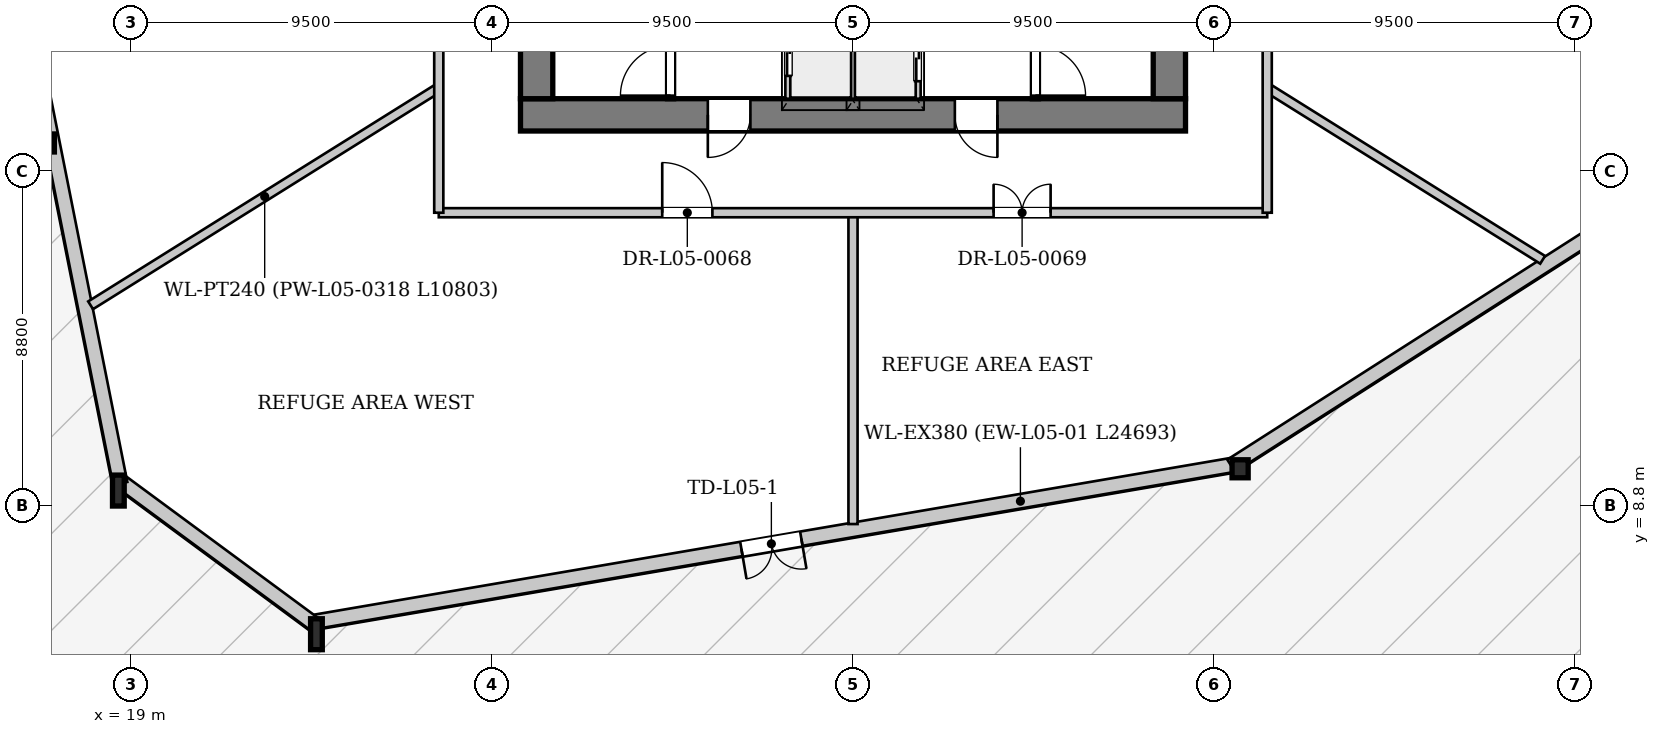
"""IFC4 building model, lengths in metres.
Left out: names, types, materials, properties, quantities, classifications, styles, units other than length and angle.
Written with IfcOpenShell. Run it as: python <this file> out.ifc"""

import sys

from ifc_helpers import new_model, si_unit, direction, frame, frame_2d, origin, origin_2d, place, context, subcontext, project, spatial, rectangle, i_section, extrude, source, transform, mapped, element, fill, save


model = new_model("IFC4")
c1 = context("Model", 3, precision=1e-05, world=origin(), true_north=direction((0.0, 1.0)))
c2 = subcontext(c1, "Body", "Model", "MODEL_VIEW")
j1 = project(units=[si_unit("LENGTHUNIT", "METRE"), si_unit("PLANEANGLEUNIT", "RADIAN")], contexts=[c1])
p1 = place(None, origin())
s1 = spatial("IfcSite", under=j1, at=p1, CompositionType="ELEMENT")
p2 = place(p1, origin())
s2 = spatial("IfcBuilding", under=s1, at=p2, CompositionType="ELEMENT")
p3 = place(p2, frame((0.0, 0.0, 24.6)))
s3 = spatial("IfcBuildingStorey", under=s2, at=p3, CompositionType="ELEMENT", Elevation=24.6)
m1 = source(origin(), c2, "Body", "SweptSolid", [
    extrude(i_section(OverallWidth=0.424, OverallDepth=0.474, WebThickness=0.043, FlangeThickness=0.068, at=origin_2d()), origin(), (0.0, 0.0, 1.0), 4.549),
])
p4 = place(p3, frame((16.708, 18.502, 0.0), z_axis=(0.028551868184, -0.073311751767, 0.996900284821), x_axis=(0.931825331576, 0.362907083747, 0.0)))
e1 = element("IfcColumn", 1, at=p4, inside=s3, PredefinedType="COLUMN", context=c2, shape_type="MappedRepresentation", body=[
    mapped(m1, transform((0.0, 0.0, 0.0), x_axis=(1.0, 0.0, 0.0), y_axis=(0.0, 1.0, 0.0), z_axis=(0.0, 0.0, 1.0), scale=1.0)),
])
m2 = source(origin(), c2, "Body", "SweptSolid", [
    extrude(i_section(OverallWidth=0.308, OverallDepth=0.814, WebThickness=0.021, FlangeThickness=0.04, at=origin_2d()), origin(), (0.0, 0.0, 1.0), 4.553),
])
p5 = place(p3, frame((18.532, 9.341, 0.0), z_axis=(0.060052750776, -0.066701448183, 0.995964147916), x_axis=(0.74317531308, 0.669096744895, 0.0)))
e2 = element("IfcColumn", 2, at=p5, inside=s3, PredefinedType="COLUMN", context=c2, shape_type="MappedRepresentation", body=[
    mapped(m2, transform((0.0, 0.0, 0.0), x_axis=(1.0, 0.0, 0.0), y_axis=(0.0, 1.0, 0.0), z_axis=(0.0, 0.0, 1.0), scale=1.0)),
])
m3 = source(origin(), c2, "Body", "SweptSolid", [
    extrude(i_section(OverallWidth=0.308, OverallDepth=0.814, WebThickness=0.021, FlangeThickness=0.04, at=origin_2d()), origin(), (0.0, 0.0, 1.0), 4.552),
])
p6 = place(p3, frame((23.714, 5.52, 0.0), z_axis=(0.073094440439, -0.048747502831, 0.996132964892), x_axis=(0.554841046628, 0.831956376847, 0.0)))
e3 = element("IfcColumn", 3, at=p6, inside=s3, PredefinedType="COLUMN", context=c2, shape_type="MappedRepresentation", body=[
    mapped(m3, transform((0.0, 0.0, 0.0), x_axis=(1.0, 0.0, 0.0), y_axis=(0.0, 1.0, 0.0), z_axis=(0.0, 0.0, 1.0), scale=1.0)),
])
m4 = source(origin(), c2, "Body", "SweptSolid", [
    extrude(i_section(OverallWidth=0.424, OverallDepth=0.474, WebThickness=0.043, FlangeThickness=0.068, at=origin_2d()), origin(), (0.0, 0.0, 1.0), 4.545),
])
p7 = place(p3, frame((48.054, 9.683, 0.0), z_axis=(0.058169293958, 0.035180874924, 0.997686643832), x_axis=(-0.517513521593, 0.855675028833, 0.0)))
e4 = element("IfcColumn", 4, at=p7, inside=s3, PredefinedType="COLUMN", context=c2, shape_type="MappedRepresentation", body=[
    mapped(m4, transform((0.0, 0.0, 0.0), x_axis=(1.0, 0.0, 0.0), y_axis=(0.0, 1.0, 0.0), z_axis=(0.0, 0.0, 1.0), scale=1.0)),
])
p8 = place(p3, frame((48.022, 9.87, 0.0), z_axis=(0.0, 0.0, 1.0), x_axis=(-0.985690903752, -0.168562873316, 0.0)))
e5 = element("IfcWall", 5, at=p8, inside=s3, PredefinedType="SOLIDWALL", context=c2, shape_type="SweptSolid", body=[
    extrude(rectangle(XDim=24.693, YDim=0.38, at=frame_2d((12.347, 0.0))), origin(), (0.0, 0.0, 1.0), 3.742),
])
p9 = place(p8, frame((11.547, 0.0, 0.0)))
e6 = element("IfcOpeningElement", 6, at=p9, cuts=e5, PredefinedType="OPENING", context=c2, shape_type="SweptSolid", body=[
    extrude(rectangle(XDim=1.6, YDim=2.3, at=frame_2d((0.8, 1.15))), frame((0.0, 0.2, 0.0), z_axis=(0.0, -1.0, 0.0), x_axis=(1.0, 0.0, 0.0)), (0.0, 0.0, 1.0), 0.4),
])
p10 = place(p3, frame((23.827, 5.673, 0.0), z_axis=(0.0, 0.0, 1.0), x_axis=(-0.804887121536, 0.593427941359, 0.0)))
e7 = element("IfcWall", 7, at=p10, inside=s3, PredefinedType="SOLIDWALL", context=c2, shape_type="SweptSolid", body=[
    extrude(rectangle(XDim=6.439, YDim=0.38, at=frame_2d((3.219, 0.0))), origin(), (0.0, 0.0, 1.0), 3.742),
])
p11 = place(p3, frame((18.718, 9.378, 0.0), z_axis=(0.0, 0.0, 1.0), x_axis=(-0.195238920641, 0.980755710596, 0.0)))
e8 = element("IfcWall", 8, at=p11, inside=s3, PredefinedType="SOLIDWALL", context=c2, shape_type="SweptSolid", body=[
    extrude(rectangle(XDim=18.681, YDim=0.38, at=frame_2d((9.34, 0.0))), origin(), (0.0, 0.0, 1.0), 3.742),
])
p12 = place(p3, frame((68.756, 23.145, 0.0), z_axis=(0.0, 0.0, 1.0), x_axis=(-0.842494342466, -0.538705191095, 0.0)))
e9 = element("IfcWall", 9, at=p12, inside=s3, PredefinedType="SOLIDWALL", context=c2, shape_type="SweptSolid", body=[
    extrude(rectangle(XDim=24.693, YDim=0.38, at=frame_2d((12.347, 0.0))), origin(), (0.0, 0.0, 1.0), 3.742),
])
p13 = place(p3, frame((46.75, 19.075, 0.0), z_axis=(0.0, 0.0, 1.0), x_axis=(-1.0, 0.0, 0.0)))
e10 = element("IfcWall", 10, at=p13, inside=s3, PredefinedType="SHEAR", context=c2, shape_type="SweptSolid", body=[
    extrude(rectangle(XDim=17.5, YDim=0.85, at=frame_2d((8.75, 0.0))), origin(), (0.0, 0.0, 1.0), 4.45),
])
p14 = place(p13, frame((4.95, 0.0, 0.0)))
e11 = element("IfcOpeningElement", 11, at=p14, cuts=e10, PredefinedType="OPENING", context=c2, shape_type="SweptSolid", body=[
    extrude(rectangle(XDim=1.12, YDim=2.25, at=frame_2d((0.56, 1.125))), frame((0.0, 0.435, 0.0), z_axis=(0.0, -1.0, 0.0), x_axis=(1.0, 0.0, 0.0)), (0.0, 0.0, 1.0), 0.87),
])
p15 = place(p13, frame((11.45, 0.0, 0.0)))
e12 = element("IfcOpeningElement", 12, at=p15, cuts=e10, PredefinedType="OPENING", context=c2, shape_type="SweptSolid", body=[
    extrude(rectangle(XDim=1.12, YDim=2.25, at=frame_2d((0.56, 1.125))), frame((0.0, 0.435, 0.0), z_axis=(0.0, -1.0, 0.0), x_axis=(1.0, 0.0, 0.0)), (0.0, 0.0, 1.0), 0.87),
])
p16 = place(p3, frame((29.675, 19.5, 0.0), z_axis=(0.0, 0.0, 1.0), x_axis=(0.0, 1.0, 0.0)))
e13 = element("IfcWall", 13, at=p16, inside=s3, PredefinedType="SHEAR", context=c2, shape_type="SweptSolid", body=[
    extrude(rectangle(XDim=14.2, YDim=0.85, at=frame_2d((7.1, 0.0))), origin(), (0.0, 0.0, 1.0), 4.45),
])
p17 = place(p16, frame((7.42, 0.0, 0.0)))
e14 = element("IfcOpeningElement", 14, at=p17, cuts=e13, PredefinedType="OPENING", context=c2, shape_type="SweptSolid", body=[
    extrude(rectangle(XDim=1.6, YDim=2.2, at=frame_2d((0.8, 1.1))), frame((0.0, 0.435, 0.0), z_axis=(0.0, -1.0, 0.0), x_axis=(1.0, 0.0, 0.0)), (0.0, 0.0, 1.0), 0.87),
])
p18 = place(p3, frame((46.325, 33.7, 0.0), z_axis=(0.0, 0.0, 1.0), x_axis=(0.0, -1.0, 0.0)))
e15 = element("IfcWall", 15, at=p18, inside=s3, PredefinedType="SHEAR", context=c2, shape_type="SweptSolid", body=[
    extrude(rectangle(XDim=14.2, YDim=0.85, at=frame_2d((7.1, 0.0))), origin(), (0.0, 0.0, 1.0), 4.45),
])
p19 = place(p18, frame((5.18, 0.0, 0.0)))
e16 = element("IfcOpeningElement", 16, at=p19, cuts=e15, PredefinedType="OPENING", context=c2, shape_type="SweptSolid", body=[
    extrude(rectangle(XDim=1.6, YDim=2.2, at=frame_2d((0.8, 1.1))), frame((0.0, 0.435, 0.0), z_axis=(0.0, -1.0, 0.0), x_axis=(1.0, 0.0, 0.0)), (0.0, 0.0, 1.0), 0.87),
])
p20 = place(p3, frame((33.2, 19.5, 0.0), z_axis=(0.0, 0.0, 1.0), x_axis=(0.0, 1.0, 0.0)))
e17 = element("IfcWall", 17, at=p20, inside=s3, PredefinedType="PARTITIONING", context=c2, shape_type="SweptSolid", body=[
    extrude(rectangle(XDim=7.46, YDim=0.16, at=frame_2d((3.73, 0.0))), origin(), (0.0, 0.0, 1.0), 4.45),
])
p21 = place(p20, frame((0.08, 0.0, 0.0)))
e18 = element("IfcOpeningElement", 18, at=p21, cuts=e17, PredefinedType="OPENING", context=c2, shape_type="SweptSolid", body=[
    extrude(rectangle(XDim=1.32, YDim=2.2, at=frame_2d((0.66, 1.1))), frame((0.0, 0.09, 0.0), z_axis=(0.0, -1.0, 0.0), x_axis=(1.0, 0.0, 0.0)), (0.0, 0.0, 1.0), 0.18),
])
p22 = place(p3, frame((42.8, 26.96, 0.0), z_axis=(0.0, 0.0, 1.0), x_axis=(0.0, -1.0, 0.0)))
e19 = element("IfcWall", 19, at=p22, inside=s3, PredefinedType="PARTITIONING", context=c2, shape_type="SweptSolid", body=[
    extrude(rectangle(XDim=7.46, YDim=0.16, at=frame_2d((3.73, 0.0))), origin(), (0.0, 0.0, 1.0), 4.45),
])
p23 = place(p22, frame((6.06, 0.0, 0.0)))
e20 = element("IfcOpeningElement", 20, at=p23, cuts=e19, PredefinedType="OPENING", context=c2, shape_type="SweptSolid", body=[
    extrude(rectangle(XDim=1.32, YDim=2.2, at=frame_2d((0.66, 1.1))), frame((0.0, 0.09, 0.0), z_axis=(0.0, -1.0, 0.0), x_axis=(1.0, 0.0, 0.0)), (0.0, 0.0, 1.0), 0.18),
])
p24 = place(p3, frame((36.3, 19.5, 0.0), z_axis=(0.0, 0.0, 1.0), x_axis=(0.0, 1.0, 0.0)))
e21 = element("IfcWall", 21, at=p24, inside=s3, PredefinedType="PARTITIONING", context=c2, shape_type="SweptSolid", body=[
    extrude(rectangle(XDim=4.78, YDim=0.16, at=frame_2d((2.39, 0.0))), origin(), (0.0, 0.0, 1.0), 4.45),
])
p25 = place(p24, frame((0.6, 0.0, 0.0)))
e22 = element("IfcOpeningElement", 22, at=p25, cuts=e21, PredefinedType="OPENING", context=c2, shape_type="SweptSolid", body=[
    extrude(rectangle(XDim=1.2, YDim=2.2, at=frame_2d((0.6, 1.1))), frame((0.0, 0.09, 0.0), z_axis=(0.0, -1.0, 0.0), x_axis=(1.0, 0.0, 0.0)), (0.0, 0.0, 1.0), 0.18),
])
p26 = place(p24, frame((2.65, 0.0, 0.0)))
e23 = element("IfcOpeningElement", 23, at=p26, cuts=e21, PredefinedType="OPENING", context=c2, shape_type="SweptSolid", body=[
    extrude(rectangle(XDim=0.95, YDim=2.1, at=frame_2d((0.475, 1.05))), frame((0.0, 0.09, 0.0), z_axis=(0.0, -1.0, 0.0), x_axis=(1.0, 0.0, 0.0)), (0.0, 0.0, 1.0), 0.18),
])
p27 = place(p3, frame((39.7, 24.28, 0.0), z_axis=(0.0, 0.0, 1.0), x_axis=(0.0, -1.0, 0.0)))
e24 = element("IfcWall", 24, at=p27, inside=s3, PredefinedType="PARTITIONING", context=c2, shape_type="SweptSolid", body=[
    extrude(rectangle(XDim=4.78, YDim=0.16, at=frame_2d((2.39, 0.0))), origin(), (0.0, 0.0, 1.0), 4.45),
])
p28 = place(p27, frame((3.12, 0.0, 0.0)))
e25 = element("IfcOpeningElement", 25, at=p28, cuts=e24, PredefinedType="OPENING", context=c2, shape_type="SweptSolid", body=[
    extrude(rectangle(XDim=1.2, YDim=2.2, at=frame_2d((0.6, 1.1))), frame((0.0, 0.09, 0.0), z_axis=(0.0, -1.0, 0.0), x_axis=(1.0, 0.0, 0.0)), (0.0, 0.0, 1.0), 0.18),
])
p29 = place(p3, frame((38.0, 19.5, 0.0), z_axis=(0.0, 0.0, 1.0), x_axis=(0.0, 1.0, 0.0)))
e26 = element("IfcWall", 26, at=p29, inside=s3, PredefinedType="PARTITIONING", context=c2, shape_type="SweptSolid", body=[
    extrude(rectangle(XDim=2.46, YDim=0.125, at=frame_2d((1.23, 0.0))), origin(), (0.0, 0.0, 1.0), 4.45),
])
p30 = place(p3, frame((27.1, 19.789, 0.0), z_axis=(0.0, 0.0, 1.0), x_axis=(-0.848052891323, -0.529911590285, 0.0)))
e27 = element("IfcWall", 27, at=p30, inside=s3, PredefinedType="PARTITIONING", context=c2, shape_type="SweptSolid", body=[
    extrude(rectangle(XDim=10.803, YDim=0.24, at=frame_2d((5.402, 0.0))), origin(), (0.0, 0.0, 1.0), 4.45),
])
p31 = place(p3, frame((38.0, 16.5, 0.0), z_axis=(0.0, 0.0, 1.0), x_axis=(0.0, -1.0, 0.0)))
e28 = element("IfcWall", 28, at=p31, inside=s3, PredefinedType="PARTITIONING", context=c2, shape_type="SweptSolid", body=[
    extrude(rectangle(XDim=8.192, YDim=0.24, at=frame_2d((4.096, 0.0))), origin(), (0.0, 0.0, 1.0), 4.45),
])
p32 = place(p3, frame((48.9, 19.789, 0.0), z_axis=(0.0, 0.0, 1.0), x_axis=(0.848056079912, -0.52990648734, 0.0)))
e29 = element("IfcWall", 29, at=p32, inside=s3, PredefinedType="PARTITIONING", context=c2, shape_type="SweptSolid", body=[
    extrude(rectangle(XDim=8.545, YDim=0.24, at=frame_2d((4.273, 0.0))), origin(), (0.0, 0.0, 1.0), 4.45),
])
p33 = place(p3, frame((27.1, 16.5, 0.0), z_axis=(0.0, 0.0, 1.0), x_axis=(1.0, 0.0, 0.0)))
e30 = element("IfcWall", 30, at=p33, inside=s3, PredefinedType="PARTITIONING", context=c2, shape_type="SweptSolid", body=[
    extrude(rectangle(XDim=21.8, YDim=0.24, at=frame_2d((10.9, 0.0))), origin(), (0.0, 0.0, 1.0), 4.45),
])
p34 = place(p33, frame((5.88, 0.0, 0.0)))
e31 = element("IfcOpeningElement", 31, at=p34, cuts=e30, PredefinedType="OPENING", context=c2, shape_type="SweptSolid", body=[
    extrude(rectangle(XDim=1.32, YDim=2.2, at=frame_2d((0.66, 1.1))), frame((0.0, 0.13, 0.0), z_axis=(0.0, -1.0, 0.0), x_axis=(1.0, 0.0, 0.0)), (0.0, 0.0, 1.0), 0.26),
])
p35 = place(p33, frame((14.6, 0.0, 0.0)))
e32 = element("IfcOpeningElement", 32, at=p35, cuts=e30, PredefinedType="OPENING", context=c2, shape_type="SweptSolid", body=[
    extrude(rectangle(XDim=1.5, YDim=2.25, at=frame_2d((0.75, 1.125))), frame((0.0, 0.13, 0.0), z_axis=(0.0, -1.0, 0.0), x_axis=(1.0, 0.0, 0.0)), (0.0, 0.0, 1.0), 0.26),
])
p36 = place(p3, frame((27.1, 16.5, 0.0), z_axis=(0.0, 0.0, 1.0), x_axis=(0.0, 1.0, 0.0)))
e33 = element("IfcWall", 33, at=p36, inside=s3, PredefinedType="PARTITIONING", context=c2, shape_type="SweptSolid", body=[
    extrude(rectangle(XDim=20.2, YDim=0.24, at=frame_2d((10.1, 0.0))), origin(), (0.0, 0.0, 1.0), 4.45),
])
p37 = place(p36, frame((5.31, 0.0, 0.0)))
e34 = element("IfcOpeningElement", 34, at=p37, cuts=e33, PredefinedType="OPENING", context=c2, shape_type="SweptSolid", body=[
    extrude(rectangle(XDim=1.5, YDim=2.25, at=frame_2d((0.75, 1.125))), frame((0.0, 0.13, 0.0), z_axis=(0.0, -1.0, 0.0), x_axis=(1.0, 0.0, 0.0)), (0.0, 0.0, 1.0), 0.26),
])
p38 = place(p36, frame((14.99, 0.0, 0.0)))
e35 = element("IfcOpeningElement", 35, at=p38, cuts=e33, PredefinedType="OPENING", context=c2, shape_type="SweptSolid", body=[
    extrude(rectangle(XDim=1.5, YDim=2.25, at=frame_2d((0.75, 1.125))), frame((0.0, 0.13, 0.0), z_axis=(0.0, -1.0, 0.0), x_axis=(1.0, 0.0, 0.0)), (0.0, 0.0, 1.0), 0.26),
])
p39 = place(p3, frame((48.9, 16.5, 0.0), z_axis=(0.0, 0.0, 1.0), x_axis=(0.0, 1.0, 0.0)))
e36 = element("IfcWall", 36, at=p39, inside=s3, PredefinedType="PARTITIONING", context=c2, shape_type="SweptSolid", body=[
    extrude(rectangle(XDim=20.2, YDim=0.24, at=frame_2d((10.1, 0.0))), origin(), (0.0, 0.0, 1.0), 4.45),
])
p40 = place(p39, frame((5.31, 0.0, 0.0)))
e37 = element("IfcOpeningElement", 37, at=p40, cuts=e36, PredefinedType="OPENING", context=c2, shape_type="SweptSolid", body=[
    extrude(rectangle(XDim=1.5, YDim=2.25, at=frame_2d((0.75, 1.125))), frame((0.0, 0.13, 0.0), z_axis=(0.0, -1.0, 0.0), x_axis=(1.0, 0.0, 0.0)), (0.0, 0.0, 1.0), 0.26),
])
p41 = place(p39, frame((13.39, 0.0, 0.0)))
e38 = element("IfcOpeningElement", 38, at=p41, cuts=e36, PredefinedType="OPENING", context=c2, shape_type="SweptSolid", body=[
    extrude(rectangle(XDim=1.5, YDim=2.25, at=frame_2d((0.75, 1.125))), frame((0.0, 0.13, 0.0), z_axis=(0.0, -1.0, 0.0), x_axis=(1.0, 0.0, 0.0)), (0.0, 0.0, 1.0), 0.26),
])
m5 = source(origin(), c2, "Body", "SweptSolid", [
    extrude(rectangle(XDim=1.6, YDim=2.3, at=frame_2d((0.8, 1.15))), frame((0.0, 0.025, 0.0), z_axis=(0.0, -1.0, 0.0), x_axis=(1.0, 0.0, 0.0)), (0.0, 0.0, 1.0), 0.05),
])
p42 = place(p9, origin())
e39 = element("IfcDoor", 39, at=p42, inside=s3, OperationType="DOUBLE_DOOR_SINGLE_SWING", PredefinedType="DOOR", context=c2, shape_type="MappedRepresentation", body=[
    mapped(m5, transform((0.0, 0.0, 0.0), x_axis=(1.0, 0.0, 0.0), y_axis=(0.0, 1.0, 0.0), z_axis=(0.0, 0.0, 1.0), scale=1.0)),
])
fill(e6, e39)
m6 = source(origin(), c2, "Body", "SweptSolid", [
    extrude(rectangle(XDim=1.12, YDim=2.25, at=frame_2d((0.56, 1.125))), frame((0.0, 0.025, 0.0), z_axis=(0.0, -1.0, 0.0), x_axis=(1.0, 0.0, 0.0)), (0.0, 0.0, 1.0), 0.05),
])
p43 = place(p14, origin())
e40 = element("IfcDoor", 40, at=p43, inside=s3, OperationType="SINGLE_SWING_LEFT", PredefinedType="DOOR", context=c2, shape_type="MappedRepresentation", body=[
    mapped(m6, transform((0.0, 0.0, 0.0), x_axis=(1.0, 0.0, 0.0), y_axis=(0.0, 1.0, 0.0), z_axis=(0.0, 0.0, 1.0), scale=1.0)),
])
fill(e11, e40)
p44 = place(p15, origin())
e41 = element("IfcDoor", 41, at=p44, inside=s3, OperationType="SINGLE_SWING_RIGHT", PredefinedType="DOOR", context=c2, shape_type="MappedRepresentation", body=[
    mapped(m6, transform((0.0, 0.0, 0.0), x_axis=(1.0, 0.0, 0.0), y_axis=(0.0, 1.0, 0.0), z_axis=(0.0, 0.0, 1.0), scale=1.0)),
])
fill(e12, e41)
m7 = source(origin(), c2, "Body", "SweptSolid", [
    extrude(rectangle(XDim=1.32, YDim=2.2, at=frame_2d((0.66, 1.1))), frame((0.0, 0.025, 0.0), z_axis=(0.0, -1.0, 0.0), x_axis=(1.0, 0.0, 0.0)), (0.0, 0.0, 1.0), 0.05),
])
p45 = place(p21, origin())
e42 = element("IfcDoor", 42, at=p45, inside=s3, OperationType="SINGLE_SWING_LEFT", PredefinedType="DOOR", context=c2, shape_type="MappedRepresentation", body=[
    mapped(m7, transform((0.0, 0.0, 0.0), x_axis=(1.0, 0.0, 0.0), y_axis=(0.0, 1.0, 0.0), z_axis=(0.0, 0.0, 1.0), scale=1.0)),
])
fill(e18, e42)
p46 = place(p23, origin())
e43 = element("IfcDoor", 43, at=p46, inside=s3, OperationType="SINGLE_SWING_RIGHT", PredefinedType="DOOR", context=c2, shape_type="MappedRepresentation", body=[
    mapped(m7, transform((0.0, 0.0, 0.0), x_axis=(1.0, 0.0, 0.0), y_axis=(0.0, 1.0, 0.0), z_axis=(0.0, 0.0, 1.0), scale=1.0)),
])
fill(e20, e43)
m8 = source(origin(), c2, "Body", "SweptSolid", [
    extrude(rectangle(XDim=1.2, YDim=2.2, at=frame_2d((0.6, 1.1))), frame((0.0, 0.025, 0.0), z_axis=(0.0, -1.0, 0.0), x_axis=(1.0, 0.0, 0.0)), (0.0, 0.0, 1.0), 0.05),
])
p47 = place(p25, origin())
e44 = element("IfcDoor", 44, at=p47, inside=s3, OperationType="DOUBLE_DOOR_SLIDING", PredefinedType="DOOR", context=c2, shape_type="MappedRepresentation", body=[
    mapped(m8, transform((0.0, 0.0, 0.0), x_axis=(1.0, 0.0, 0.0), y_axis=(0.0, 1.0, 0.0), z_axis=(0.0, 0.0, 1.0), scale=1.0)),
])
fill(e22, e44)
p48 = place(p28, origin())
e45 = element("IfcDoor", 45, at=p48, inside=s3, OperationType="DOUBLE_DOOR_SLIDING", PredefinedType="DOOR", context=c2, shape_type="MappedRepresentation", body=[
    mapped(m8, transform((0.0, 0.0, 0.0), x_axis=(1.0, 0.0, 0.0), y_axis=(0.0, 1.0, 0.0), z_axis=(0.0, 0.0, 1.0), scale=1.0)),
])
fill(e25, e45)
p49 = place(p34, origin())
e46 = element("IfcDoor", 46, at=p49, inside=s3, OperationType="SINGLE_SWING_LEFT", PredefinedType="DOOR", context=c2, shape_type="MappedRepresentation", body=[
    mapped(m7, transform((0.0, 0.0, 0.0), x_axis=(1.0, 0.0, 0.0), y_axis=(0.0, 1.0, 0.0), z_axis=(0.0, 0.0, 1.0), scale=1.0)),
])
fill(e31, e46)
m9 = source(origin(), c2, "Body", "SweptSolid", [
    extrude(rectangle(XDim=1.5, YDim=2.25, at=frame_2d((0.75, 1.125))), frame((0.0, 0.025, 0.0), z_axis=(0.0, -1.0, 0.0), x_axis=(1.0, 0.0, 0.0)), (0.0, 0.0, 1.0), 0.05),
])
p50 = place(p35, origin())
e47 = element("IfcDoor", 47, at=p50, inside=s3, OperationType="DOUBLE_DOOR_SINGLE_SWING", PredefinedType="DOOR", context=c2, shape_type="MappedRepresentation", body=[
    mapped(m9, transform((0.0, 0.0, 0.0), x_axis=(1.0, 0.0, 0.0), y_axis=(0.0, 1.0, 0.0), z_axis=(0.0, 0.0, 1.0), scale=1.0)),
])
fill(e32, e47)
save(model, sys.argv[1])
